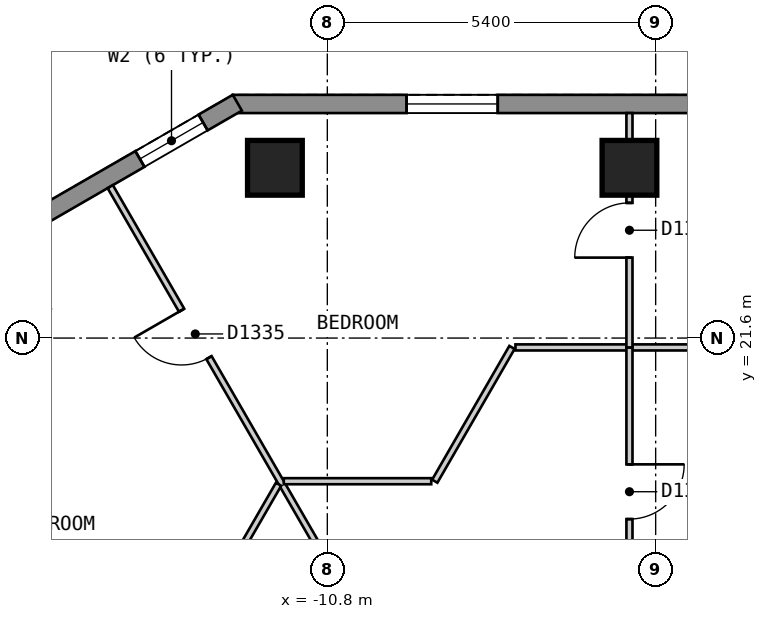
"""IFC4 building model, lengths in metres.
Left out: names, types, materials, properties, quantities, classifications, styles, units other than length and angle.
Written with IfcOpenShell. Run it as: python <this file> out.ifc"""

import sys

from ifc_helpers import new_model, si_unit, direction, frame, frame_2d, origin, origin_2d, place, context, subcontext, project, spatial, polyline, rectangle, outline, extrude, element, fill, save


model = new_model("IFC4")
c1 = context("Model", 3, precision=1e-05, world=origin(), true_north=direction((0.0, 1.0)))
c2 = subcontext(c1, "Body", "Model", "MODEL_VIEW")
j1 = project(units=[si_unit("LENGTHUNIT", "METRE"), si_unit("PLANEANGLEUNIT", "RADIAN")], contexts=[c1])
p1 = place(None, origin())
s1 = spatial("IfcSite", under=j1, at=p1, CompositionType="ELEMENT")
p2 = place(p1, origin())
s2 = spatial("IfcBuilding", under=s1, at=p2, CompositionType="ELEMENT")
p3 = place(p2, frame((0.0, 0.0, 147.6)))
s3 = spatial("IfcBuildingStorey", under=s2, at=p3, CompositionType="ELEMENT", Elevation=147.6)
for number, where, z_axis, x_axis in (
    (1, (-5.831, 24.4, 0.0), (0.0, 0.0, 1.0), (-1.0, 0.0, 0.0)),
    (2, (-11.662, 24.4, 0.0), (0.0, 0.0, 1.0), (-1.0, 0.0, 0.0)),
):
    element("IfcColumn", number, at=place(p3, frame(where, z_axis=z_axis, x_axis=x_axis)), inside=s3, PredefinedType="COLUMN", context=c2, shape_type="SweptSolid", body=[
        extrude(rectangle(XDim=0.9, YDim=0.9, at=origin_2d()), origin(), (0.0, 0.0, 1.0), 3.0),
    ])
p4 = place(p3, frame((12.355, 25.45, 0.0), z_axis=(0.0, 0.0, 1.0), x_axis=(-1.0, 0.0, 0.0)))
e3 = element("IfcWall", 3, at=p4, inside=s3, PredefinedType="SOLIDWALL", context=c2, shape_type="SweptSolid", body=[
    extrude(outline(polyline([(0.0, -0.15), (24.71, -0.15), (24.63, 0.15), (0.08, 0.15), (0.0, -0.15)])), origin(), (0.0, 0.0, 1.0), 2.7),
])
p5 = place(p4, frame((2.858, 0.0, 0.15)))
e4 = element("IfcOpeningElement", 4, at=p5, cuts=e3, PredefinedType="OPENING", context=c2, shape_type="SweptSolid", body=[
    extrude(rectangle(XDim=1.5, YDim=2.1, at=frame_2d((0.75, 1.05))), frame((0.0, 0.16, 0.0), z_axis=(0.0, -1.0, 0.0), x_axis=(1.0, 0.0, 0.0)), (0.0, 0.0, 1.0), 0.32),
])
p6 = place(p4, frame((8.689, 0.0, 0.15)))
e5 = element("IfcOpeningElement", 5, at=p6, cuts=e3, PredefinedType="OPENING", context=c2, shape_type="SweptSolid", body=[
    extrude(rectangle(XDim=1.5, YDim=2.1, at=frame_2d((0.75, 1.05))), frame((0.0, 0.16, 0.0), z_axis=(0.0, -1.0, 0.0), x_axis=(1.0, 0.0, 0.0)), (0.0, 0.0, 1.0), 0.32),
])
p7 = place(p4, frame((14.521, 0.0, 0.15)))
e6 = element("IfcOpeningElement", 6, at=p7, cuts=e3, PredefinedType="OPENING", context=c2, shape_type="SweptSolid", body=[
    extrude(rectangle(XDim=1.5, YDim=2.1, at=frame_2d((0.75, 1.05))), frame((0.0, 0.16, 0.0), z_axis=(0.0, -1.0, 0.0), x_axis=(1.0, 0.0, 0.0)), (0.0, 0.0, 1.0), 0.32),
])
p8 = place(p4, frame((20.352, 0.0, 0.15)))
e7 = element("IfcOpeningElement", 7, at=p8, cuts=e3, PredefinedType="OPENING", context=c2, shape_type="SweptSolid", body=[
    extrude(rectangle(XDim=1.5, YDim=2.1, at=frame_2d((0.75, 1.05))), frame((0.0, 0.16, 0.0), z_axis=(0.0, -1.0, 0.0), x_axis=(1.0, 0.0, 0.0)), (0.0, 0.0, 1.0), 0.32),
])
p9 = place(p3, frame((-12.28, 25.47, 0.0), z_axis=(0.0, 0.0, 1.0), x_axis=(-0.866022959057, -0.500004234368, 0.0)))
e8 = element("IfcWall", 8, at=p9, inside=s3, PredefinedType="SOLIDWALL", context=c2, shape_type="SweptSolid", body=[
    extrude(outline(polyline([(0.0, -0.15), (5.0, -0.15), (4.92, 0.15), (0.08, 0.15), (0.0, -0.15)])), origin(), (0.0, 0.0, 1.0), 2.7),
])
p10 = place(p9, frame((0.65, 0.0, 0.15)))
e9 = element("IfcOpeningElement", 9, at=p10, cuts=e8, PredefinedType="OPENING", context=c2, shape_type="SweptSolid", body=[
    extrude(rectangle(XDim=1.2, YDim=2.1, at=frame_2d((0.6, 1.05))), frame((0.0, 0.16, 0.0), z_axis=(0.0, -1.0, 0.0), x_axis=(1.0, 0.0, 0.0)), (0.0, 0.0, 1.0), 0.32),
])
p11 = place(p3, frame((-14.37, 24.09, 0.0), z_axis=(0.0, 0.0, 1.0), x_axis=(0.50002438799, -0.866011322914, 0.0)))
e10 = element("IfcWall", 10, at=p11, inside=s3, PredefinedType="PARTITIONING", context=c2, shape_type="SweptSolid", body=[
    extrude(rectangle(XDim=10.266, YDim=0.1, at=frame_2d((5.133, 0.0))), origin(), (0.0, 0.0, 1.0), 2.7),
])
p12 = place(p11, frame((2.347, 0.0, 0.0)))
e11 = element("IfcOpeningElement", 11, at=p12, cuts=e10, PredefinedType="OPENING", context=c2, shape_type="SweptSolid", body=[
    extrude(rectangle(XDim=0.9, YDim=2.1, at=frame_2d((0.45, 1.05))), frame((0.0, 0.06, 0.0), z_axis=(0.0, -1.0, 0.0), x_axis=(1.0, 0.0, 0.0)), (0.0, 0.0, 1.0), 0.12),
])
p13 = place(p3, frame((-11.516, 19.246, 0.0), z_axis=(0.0, 0.0, 1.0), x_axis=(1.0, 0.0, 0.0)))
e12 = element("IfcWall", 12, at=p13, inside=s3, PredefinedType="PARTITIONING", context=c2, shape_type="SweptSolid", body=[
    extrude(rectangle(XDim=2.425, YDim=0.1, at=frame_2d((1.212, 0.0))), origin(), (0.0, 0.0, 1.0), 2.7),
])
p14 = place(p3, frame((-7.706, 21.446, 0.0), z_axis=(0.0, 0.0, 1.0), x_axis=(1.0, 0.0, 0.0)))
e13 = element("IfcWall", 13, at=p14, inside=s3, PredefinedType="PARTITIONING", context=c2, shape_type="SweptSolid", body=[
    extrude(rectangle(XDim=15.469, YDim=0.1, at=frame_2d((7.734, 0.0))), origin(), (0.0, 0.0, 1.0), 2.7),
])
p15 = place(p14, frame((4.35, 0.0, 0.0)))
e14 = element("IfcOpeningElement", 14, at=p15, cuts=e13, PredefinedType="OPENING", context=c2, shape_type="SweptSolid", body=[
    extrude(rectangle(XDim=0.9, YDim=2.1, at=frame_2d((0.45, 1.05))), frame((0.0, 0.06, 0.0), z_axis=(0.0, -1.0, 0.0), x_axis=(1.0, 0.0, 0.0)), (0.0, 0.0, 1.0), 0.12),
])
p16 = place(p3, frame((-9.033, 19.246, 0.0), z_axis=(0.0, 0.0, 1.0), x_axis=(0.499963722229, 0.866046347752, 0.0)))
e15 = element("IfcWall", 15, at=p16, inside=s3, PredefinedType="PARTITIONING", context=c2, shape_type="SweptSolid", body=[
    extrude(rectangle(XDim=2.54, YDim=0.1, at=frame_2d((1.27, 0.0))), origin(), (0.0, 0.0, 1.0), 2.7),
])
p17 = place(p3, frame((-14.222, 14.659, 0.0), z_axis=(0.0, 0.0, 1.0), x_axis=(0.500053212623, 0.865994679283, 0.0)))
e16 = element("IfcWall", 16, at=p17, inside=s3, PredefinedType="PARTITIONING", context=c2, shape_type="SweptSolid", body=[
    extrude(rectangle(XDim=5.239, YDim=0.1, at=frame_2d((2.62, 0.0))), origin(), (0.0, 0.0, 1.0), 2.7),
])
p18 = place(p17, frame((2.198, 0.0, 0.0)))
e17 = element("IfcOpeningElement", 17, at=p18, cuts=e16, PredefinedType="OPENING", context=c2, shape_type="SweptSolid", body=[
    extrude(rectangle(XDim=0.8, YDim=2.1, at=frame_2d((0.4, 1.05))), frame((0.0, 0.06, 0.0), z_axis=(0.0, -1.0, 0.0), x_axis=(1.0, 0.0, 0.0)), (0.0, 0.0, 1.0), 0.12),
])
p19 = place(p3, frame((-5.831, 16.9, 0.0), z_axis=(0.0, 0.0, 1.0), x_axis=(0.0, 1.0, 0.0)))
e18 = element("IfcWall", 18, at=p19, inside=s3, PredefinedType="PARTITIONING", context=c2, shape_type="SweptSolid", body=[
    extrude(rectangle(XDim=4.546, YDim=0.1, at=frame_2d((2.273, 0.0))), origin(), (0.0, 0.0, 1.0), 2.7),
])
p20 = place(p19, frame((1.723, 0.0, 0.0)))
e19 = element("IfcOpeningElement", 19, at=p20, cuts=e18, PredefinedType="OPENING", context=c2, shape_type="SweptSolid", body=[
    extrude(rectangle(XDim=0.9, YDim=2.1, at=frame_2d((0.45, 1.05))), frame((0.0, 0.06, 0.0), z_axis=(0.0, -1.0, 0.0), x_axis=(1.0, 0.0, 0.0)), (0.0, 0.0, 1.0), 0.12),
])
p21 = place(p3, frame((-5.831, 21.446, 0.0), z_axis=(0.0, 0.0, 1.0), x_axis=(0.0, 1.0, 0.0)))
e20 = element("IfcWall", 20, at=p21, inside=s3, PredefinedType="PARTITIONING", context=c2, shape_type="SweptSolid", body=[
    extrude(rectangle(XDim=3.854, YDim=0.1, at=frame_2d((1.927, 0.0))), origin(), (0.0, 0.0, 1.0), 2.7),
])
p22 = place(p21, frame((1.477, 0.0, 0.0)))
e21 = element("IfcOpeningElement", 21, at=p22, cuts=e20, PredefinedType="OPENING", context=c2, shape_type="SweptSolid", body=[
    extrude(rectangle(XDim=0.9, YDim=2.1, at=frame_2d((0.45, 1.05))), frame((0.0, 0.06, 0.0), z_axis=(0.0, -1.0, 0.0), x_axis=(1.0, 0.0, 0.0)), (0.0, 0.0, 1.0), 0.12),
])
p23 = place(p8, origin())
e22 = element("IfcWindow", 22, at=p23, inside=s3, PartitioningType="SINGLE_PANEL", PredefinedType="WINDOW", context=c2, shape_type="SweptSolid", body=[
    extrude(rectangle(XDim=1.5, YDim=2.1, at=frame_2d((0.75, 1.05))), frame((0.0, 0.03, 0.0), z_axis=(0.0, -1.0, 0.0), x_axis=(1.0, 0.0, 0.0)), (0.0, 0.0, 1.0), 0.06),
])
fill(e7, e22)
p24 = place(p10, origin())
e23 = element("IfcWindow", 23, at=p24, inside=s3, PartitioningType="SINGLE_PANEL", PredefinedType="WINDOW", context=c2, shape_type="SweptSolid", body=[
    extrude(rectangle(XDim=1.2, YDim=2.1, at=frame_2d((0.6, 1.05))), frame((0.0, 0.03, 0.0), z_axis=(0.0, -1.0, 0.0), x_axis=(1.0, 0.0, 0.0)), (0.0, 0.0, 1.0), 0.06),
])
fill(e9, e23)
p25 = place(p20, origin())
e24 = element("IfcDoor", 24, at=p25, inside=s3, OperationType="SINGLE_SWING_RIGHT", PredefinedType="DOOR", context=c2, shape_type="SweptSolid", body=[
    extrude(rectangle(XDim=0.9, YDim=2.1, at=frame_2d((0.45, 1.05))), frame((0.0, 0.025, 0.0), z_axis=(0.0, -1.0, 0.0), x_axis=(1.0, 0.0, 0.0)), (0.0, 0.0, 1.0), 0.05),
])
fill(e19, e24)
p26 = place(p22, origin())
e25 = element("IfcDoor", 25, at=p26, inside=s3, OperationType="SINGLE_SWING_LEFT", PredefinedType="DOOR", context=c2, shape_type="SweptSolid", body=[
    extrude(rectangle(XDim=0.9, YDim=2.1, at=frame_2d((0.45, 1.05))), frame((0.0, 0.025, 0.0), z_axis=(0.0, -1.0, 0.0), x_axis=(1.0, 0.0, 0.0)), (0.0, 0.0, 1.0), 0.05),
])
fill(e21, e25)
p27 = place(p12, origin())
e26 = element("IfcDoor", 26, at=p27, inside=s3, OperationType="SINGLE_SWING_LEFT", PredefinedType="DOOR", context=c2, shape_type="SweptSolid", body=[
    extrude(rectangle(XDim=0.9, YDim=2.1, at=frame_2d((0.45, 1.05))), frame((0.0, 0.025, 0.0), z_axis=(0.0, -1.0, 0.0), x_axis=(1.0, 0.0, 0.0)), (0.0, 0.0, 1.0), 0.05),
])
fill(e11, e26)
save(model, sys.argv[1])
